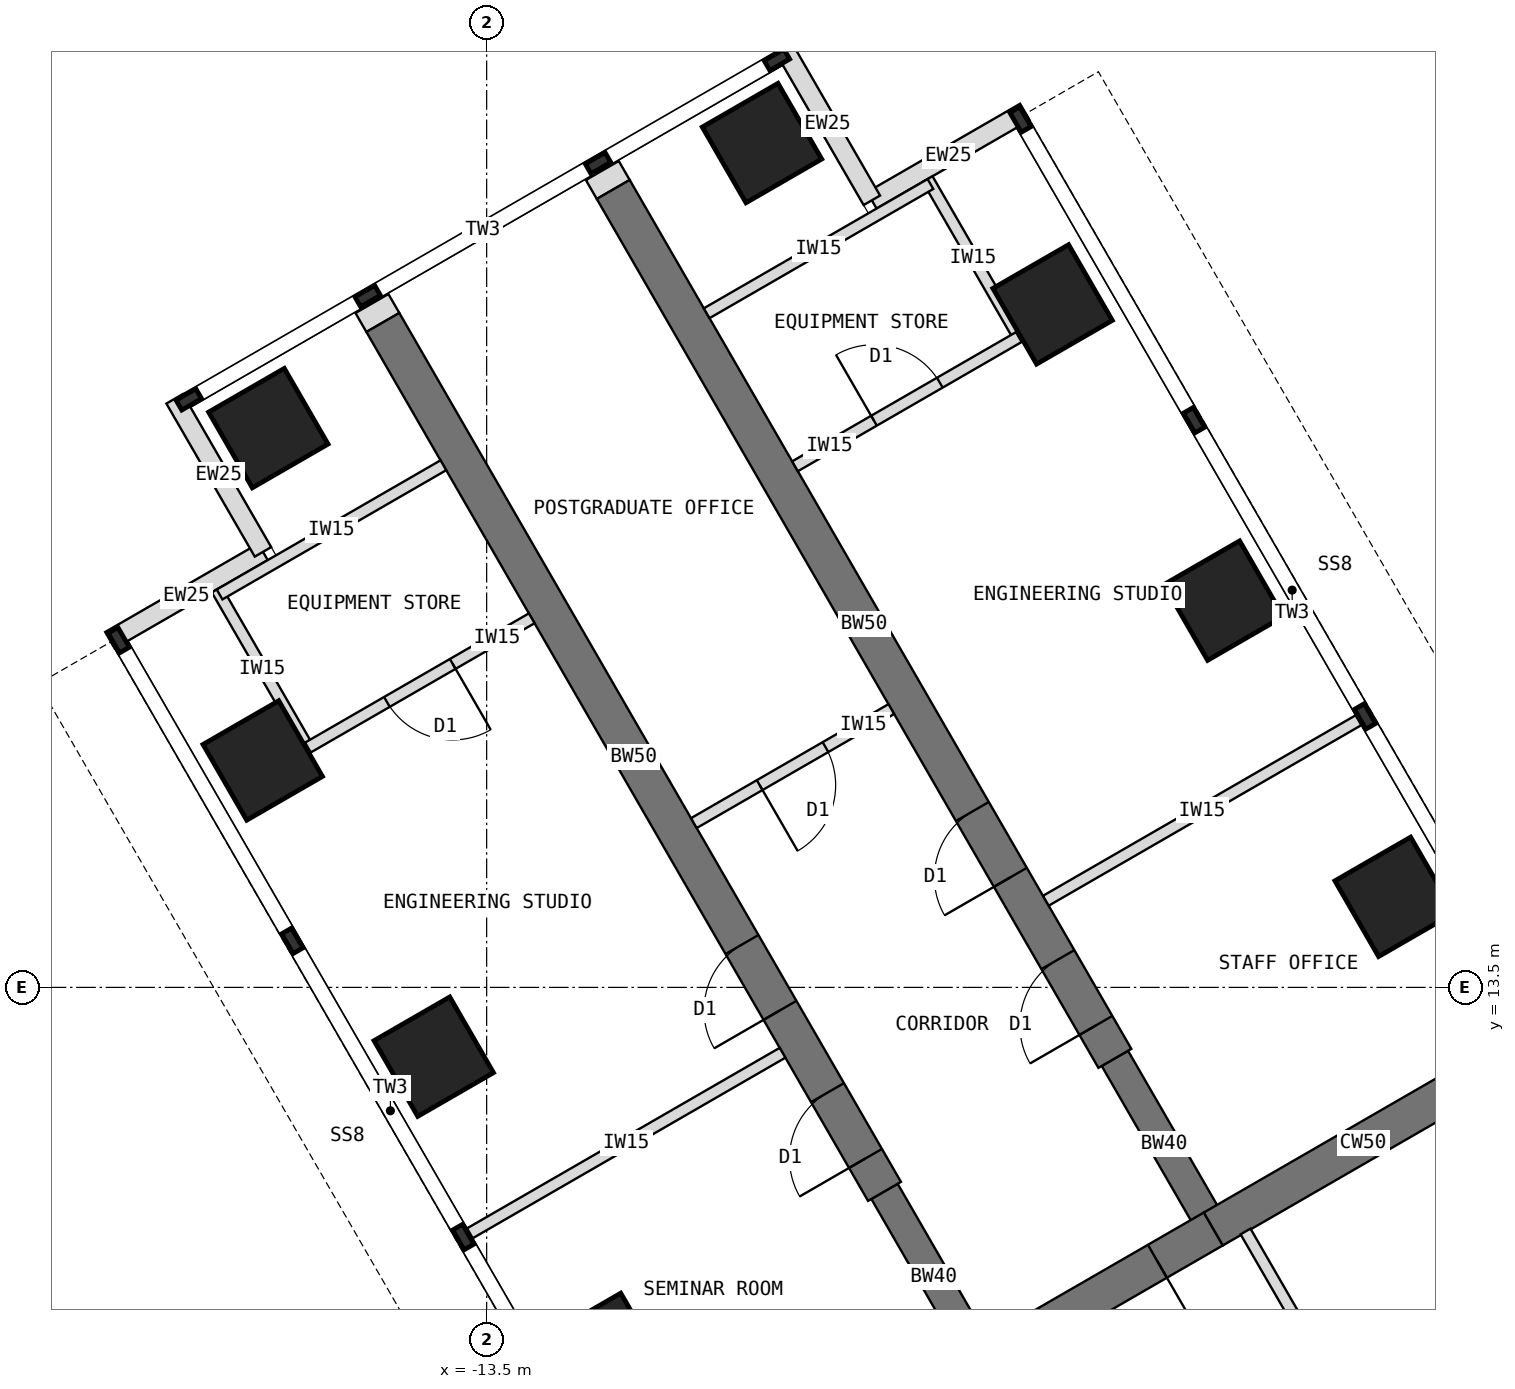
"""IFC4 building model, lengths in metres.
Left out: names, types, materials, properties, quantities, classifications, styles, units other than length and angle.
Written with IfcOpenShell. Run it as: python <this file> out.ifc"""

import sys

from ifc_helpers import new_model, si_unit, direction, frame, frame_2d, origin, origin_2d, place, context, subcontext, project, spatial, rectangle, extrude, element, fill, save


model = new_model("IFC4")
c1 = context("Model", 3, precision=1e-05, world=origin(), true_north=direction((0.0, 1.0)))
c2 = subcontext(c1, "Body", "Model", "MODEL_VIEW")
j1 = project(units=[si_unit("LENGTHUNIT", "METRE"), si_unit("PLANEANGLEUNIT", "RADIAN")], contexts=[c1])
p1 = place(None, origin())
s1 = spatial("IfcSite", under=j1, at=p1, CompositionType="ELEMENT")
p2 = place(p1, origin())
s2 = spatial("IfcBuilding", under=s1, at=p2, CompositionType="ELEMENT")
p3 = place(p2, frame((0.0, 0.0, 206.5)))
s3 = spatial("IfcBuildingStorey", under=s2, at=p3, CompositionType="ELEMENT", Elevation=206.5)
p4 = place(p3, frame((0.0, 12.596, 0.0), z_axis=(0.0, 0.0, 1.0), x_axis=(-0.866011268655, -0.500024481964, 0.0)))
e1 = element("IfcWall", 1, at=p4, inside=s3, PredefinedType="SHEAR", context=c2, shape_type="SweptSolid", body=[
    extrude(rectangle(XDim=4.548, YDim=0.5, at=frame_2d((2.274, 0.0))), origin(), (0.0, 0.0, 1.0), 4.0),
])
p5 = place(p3, frame((-3.939, 10.322, 0.0), z_axis=(0.0, 0.0, 1.0), x_axis=(-0.866019471182, -0.500010275428, 0.0)))
e2 = element("IfcWall", 2, at=p5, inside=s3, PredefinedType="SHEAR", context=c2, shape_type="SweptSolid", body=[
    extrude(rectangle(XDim=3.5, YDim=0.5, at=frame_2d((1.75, 0.0))), origin(), (0.0, 0.0, 1.0), 4.0),
])
p6 = place(p5, frame((0.85, 0.0, 0.0)))
e3 = element("IfcOpeningElement", 3, at=p6, cuts=e2, PredefinedType="OPENING", context=c2, shape_type="SweptSolid", body=[
    extrude(rectangle(XDim=1.8, YDim=2.1, at=frame_2d((0.9, 1.05))), frame((0.0, 0.26, 0.0), z_axis=(0.0, -1.0, 0.0), x_axis=(1.0, 0.0, 0.0)), (0.0, 0.0, 1.0), 0.52),
])
p7 = place(p3, frame((-6.97, 8.572, 0.0), z_axis=(0.0, 0.0, 1.0), x_axis=(-0.499988811324, 0.866031863473, 0.0)))
e4 = element("IfcWall", 4, at=p7, inside=s3, PredefinedType="SHEAR", context=c2, shape_type="SweptSolid", body=[
    extrude(rectangle(XDim=2.592, YDim=0.4, at=frame_2d((1.296, 0.0))), origin(), (0.0, 0.0, 1.0), 4.0),
])
p8 = place(p3, frame((-8.266, 10.816, 0.0), z_axis=(0.0, 0.0, 1.0), x_axis=(-0.499996231654, 0.866027579429, 0.0)))
e5 = element("IfcWall", 5, at=p8, inside=s3, PredefinedType="SHEAR", context=c2, shape_type="SweptSolid", body=[
    extrude(rectangle(XDim=13.2, YDim=0.5, at=frame_2d((6.6, 0.0))), origin(), (0.0, 0.0, 1.0), 4.0),
])
p9 = place(p8, frame((0.5, 0.0, 0.0)))
e6 = element("IfcOpeningElement", 6, at=p9, cuts=e5, PredefinedType="OPENING", context=c2, shape_type="SweptSolid", body=[
    extrude(rectangle(XDim=1.0, YDim=2.1, at=frame_2d((0.5, 1.05))), frame((0.0, 0.26, 0.0), z_axis=(0.0, -1.0, 0.0), x_axis=(1.0, 0.0, 0.0)), (0.0, 0.0, 1.0), 0.52),
])
p10 = place(p8, frame((2.75, 0.0, 0.0)))
e7 = element("IfcOpeningElement", 7, at=p10, cuts=e5, PredefinedType="OPENING", context=c2, shape_type="SweptSolid", body=[
    extrude(rectangle(XDim=1.0, YDim=2.1, at=frame_2d((0.5, 1.05))), frame((0.0, 0.26, 0.0), z_axis=(0.0, -1.0, 0.0), x_axis=(1.0, 0.0, 0.0)), (0.0, 0.0, 1.0), 0.52),
])
p11 = place(p3, frame((-3.939, 10.322, 0.0), z_axis=(0.0, 0.0, 1.0), x_axis=(-0.499918158782, 0.866072649678, 0.0)))
e8 = element("IfcWall", 8, at=p11, inside=s3, PredefinedType="SHEAR", context=c2, shape_type="SweptSolid", body=[
    extrude(rectangle(XDim=2.592, YDim=0.4, at=frame_2d((1.296, 0.0))), origin(), (0.0, 0.0, 1.0), 4.0),
])
p12 = place(p3, frame((-5.234, 12.566, 0.0), z_axis=(0.0, 0.0, 1.0), x_axis=(-0.500010103361, 0.866019570528, 0.0)))
e9 = element("IfcWall", 9, at=p12, inside=s3, PredefinedType="SHEAR", context=c2, shape_type="SweptSolid", body=[
    extrude(rectangle(XDim=13.2, YDim=0.5, at=frame_2d((6.6, 0.0))), origin(), (0.0, 0.0, 1.0), 4.0),
])
p13 = place(p12, frame((0.5, 0.0, 0.0)))
e10 = element("IfcOpeningElement", 10, at=p13, cuts=e9, PredefinedType="OPENING", context=c2, shape_type="SweptSolid", body=[
    extrude(rectangle(XDim=1.0, YDim=2.1, at=frame_2d((0.5, 1.05))), frame((0.0, 0.26, 0.0), z_axis=(0.0, -1.0, 0.0), x_axis=(1.0, 0.0, 0.0)), (0.0, 0.0, 1.0), 0.52),
])
p14 = place(p12, frame((2.75, 0.0, 0.0)))
e11 = element("IfcOpeningElement", 11, at=p14, cuts=e9, PredefinedType="OPENING", context=c2, shape_type="SweptSolid", body=[
    extrude(rectangle(XDim=1.0, YDim=2.1, at=frame_2d((0.5, 1.05))), frame((0.0, 0.26, 0.0), z_axis=(0.0, -1.0, 0.0), x_axis=(1.0, 0.0, 0.0)), (0.0, 0.0, 1.0), 0.52),
])
for number, where, z_axis, x_axis in (
    (12, (-11.946, 8.691, 0.0), (0.0, 0.0, 1.0), (0.866, 0.5, 0.0)),
    (13, (-1.554, 14.691, 0.0), (0.0, 0.0, 1.0), (0.866, 0.5, 0.0)),
    (14, (-14.196, 12.588, 0.0), (0.0, 0.0, 1.0), (0.866, 0.5, 0.0)),
    (15, (-3.804, 18.588, 0.0), (0.0, 0.0, 1.0), (0.866, 0.5, 0.0)),
    (16, (-16.446, 16.486, 0.0), (0.0, 0.0, 1.0), (0.866, 0.5, 0.0)),
    (17, (-6.054, 22.486, 0.0), (0.0, 0.0, 1.0), (0.866, 0.5, 0.0)),
    (18, (-16.373, 20.858, 0.0), (0.0, 0.0, 1.0), (0.866, 0.5, 0.0)),
    (19, (-9.877, 24.608, 0.0), (0.0, 0.0, 1.0), (0.866, 0.5, 0.0)),
):
    element("IfcColumn", number, at=place(p3, frame(where, z_axis=z_axis, x_axis=x_axis)), inside=s3, PredefinedType="COLUMN", context=c2, shape_type="SweptSolid", body=[
        extrude(rectangle(XDim=1.15, YDim=1.15, at=origin_2d()), origin(), (0.0, 0.0, 1.0), 4.0),
    ])
for number, where, z_axis, x_axis in (
    (20, (-18.456, 18.067, 0.0), (0.0, 0.0, 1.0), (0.866, 0.5, 0.0)),
    (21, (-16.443, 19.23, 0.0), (0.0, 0.0, 1.0), (-0.5, 0.866, 0.0)),
    (22, (-6.419, 25.017, 0.0), (0.0, 0.0, 1.0), (-0.866, -0.5, 0.0)),
    (23, (-8.432, 23.855, 0.0), (0.0, 0.0, 1.0), (-0.5, 0.866, 0.0)),
):
    element("IfcWall", number, at=place(p3, frame(where, z_axis=z_axis, x_axis=x_axis)), inside=s3, PredefinedType="STANDARD", context=c2, shape_type="SweptSolid", body=[
        extrude(rectangle(XDim=2.325, YDim=0.25, at=frame_2d((1.163, 0.0))), origin(), (0.0, 0.0, 1.0), 3.8),
    ])
for number, where, z_axis, x_axis in (
    (24, (-14.865, 22.248, 0.0), (0.0, 0.0, 1.0), (-0.5, 0.866, 0.0)),
    (25, (-11.834, 23.998, 0.0), (0.0, 0.0, 1.0), (-0.5, 0.866, 0.0)),
):
    element("IfcWall", number, at=place(p3, frame(where, z_axis=z_axis, x_axis=x_axis)), inside=s3, PredefinedType="PARTITIONING", context=c2, shape_type="SweptSolid", body=[
        extrude(rectangle(XDim=0.288, YDim=0.5, at=frame_2d((0.144, 0.0))), origin(), (0.0, 0.0, 1.0), 3.8),
    ])
p15 = place(p3, frame((-1.201, 6.12, 0.0), z_axis=(0.0, 0.0, 1.0), x_axis=(0.500021575205, 0.866012946976, 0.0)))
e26 = element("IfcWall", 26, at=p15, inside=s3, PredefinedType="SHEAR", context=c2, shape_type="SweptSolid", body=[
    extrude(rectangle(XDim=5.958, YDim=0.4, at=frame_2d((2.979, 0.0))), origin(), (0.0, 0.0, 1.0), 4.0),
])
p16 = place(p3, frame((-9.607, 12.64, 0.0), z_axis=(0.0, 0.0, 1.0), x_axis=(-0.866033238375, -0.499986429846, 0.0)))
e27 = element("IfcWall", 27, at=p16, inside=s3, PredefinedType="PARTITIONING", context=c2, shape_type="SweptSolid", body=[
    extrude(rectangle(XDim=4.75, YDim=0.15, at=frame_2d((2.375, 0.0))), origin(), (0.0, 0.0, 1.0), 3.8),
])
p17 = place(p3, frame((-15.852, 16.656, 0.0), z_axis=(0.0, 0.0, 1.0), x_axis=(-0.500001309137, 0.866024647952, 0.0)))
e28 = element("IfcWall", 28, at=p17, inside=s3, PredefinedType="PARTITIONING", context=c2, shape_type="SweptSolid", body=[
    extrude(rectangle(XDim=2.4, YDim=0.15, at=frame_2d((1.2, 0.0))), origin(), (0.0, 0.0, 1.0), 3.8),
])
p18 = place(p3, frame((-12.907, 18.356, 0.0), z_axis=(0.0, 0.0, 1.0), x_axis=(-0.866038511948, -0.499977295307, 0.0)))
e29 = element("IfcWall", 29, at=p18, inside=s3, PredefinedType="PARTITIONING", context=c2, shape_type="SweptSolid", body=[
    extrude(rectangle(XDim=3.4, YDim=0.15, at=frame_2d((1.7, 0.0))), origin(), (0.0, 0.0, 1.0), 3.8),
])
p19 = place(p18, frame((1.2, 0.0, 0.0)))
e30 = element("IfcOpeningElement", 30, at=p19, cuts=e29, PredefinedType="OPENING", context=c2, shape_type="SweptSolid", body=[
    extrude(rectangle(XDim=1.0, YDim=2.1, at=frame_2d((0.5, 1.05))), frame((0.0, 0.085, 0.0), z_axis=(0.0, -1.0, 0.0), x_axis=(1.0, 0.0, 0.0)), (0.0, 0.0, 1.0), 0.17),
])
p20 = place(p3, frame((-14.07, 20.369, 0.0), z_axis=(0.0, 0.0, 1.0), x_axis=(-0.866020560687, -0.500008388397, 0.0)))
e31 = element("IfcWall", 31, at=p20, inside=s3, PredefinedType="PARTITIONING", context=c2, shape_type="SweptSolid", body=[
    extrude(rectangle(XDim=3.4, YDim=0.15, at=frame_2d((1.7, 0.0))), origin(), (0.0, 0.0, 1.0), 3.8),
])
p21 = place(p3, frame((-6.143, 14.64, 0.0), z_axis=(0.0, 0.0, 1.0), x_axis=(0.866033238375, 0.499986429846, 0.0)))
e32 = element("IfcWall", 32, at=p21, inside=s3, PredefinedType="PARTITIONING", context=c2, shape_type="SweptSolid", body=[
    extrude(rectangle(XDim=4.75, YDim=0.15, at=frame_2d((2.375, 0.0))), origin(), (0.0, 0.0, 1.0), 3.8),
])
p22 = place(p3, frame((-6.499, 22.056, 0.0), z_axis=(0.0, 0.0, 1.0), x_axis=(-0.500001309137, 0.866024647952, 0.0)))
e33 = element("IfcWall", 33, at=p22, inside=s3, PredefinedType="PARTITIONING", context=c2, shape_type="SweptSolid", body=[
    extrude(rectangle(XDim=2.4, YDim=0.15, at=frame_2d((1.2, 0.0))), origin(), (0.0, 0.0, 1.0), 3.8),
])
p23 = place(p3, frame((-9.443, 20.356, 0.0), z_axis=(0.0, 0.0, 1.0), x_axis=(0.866020560687, 0.500008388397, 0.0)))
e34 = element("IfcWall", 34, at=p23, inside=s3, PredefinedType="PARTITIONING", context=c2, shape_type="SweptSolid", body=[
    extrude(rectangle(XDim=3.4, YDim=0.15, at=frame_2d((1.7, 0.0))), origin(), (0.0, 0.0, 1.0), 3.8),
])
p24 = place(p23, frame((1.2, 0.0, 0.0)))
e35 = element("IfcOpeningElement", 35, at=p24, cuts=e34, PredefinedType="OPENING", context=c2, shape_type="SweptSolid", body=[
    extrude(rectangle(XDim=1.0, YDim=2.1, at=frame_2d((0.5, 1.05))), frame((0.0, 0.085, 0.0), z_axis=(0.0, -1.0, 0.0), x_axis=(1.0, 0.0, 0.0)), (0.0, 0.0, 1.0), 0.17),
])
p25 = place(p3, frame((-10.605, 22.369, 0.0), z_axis=(0.0, 0.0, 1.0), x_axis=(0.866038511948, 0.499977295307, 0.0)))
e36 = element("IfcWall", 36, at=p25, inside=s3, PredefinedType="PARTITIONING", context=c2, shape_type="SweptSolid", body=[
    extrude(rectangle(XDim=3.4, YDim=0.15, at=frame_2d((1.7, 0.0))), origin(), (0.0, 0.0, 1.0), 3.8),
])
p26 = place(p3, frame((-3.515, 10.289, 0.0), z_axis=(0.0, 0.0, 1.0), x_axis=(0.499968392031, -0.866043651885, 0.0)))
e37 = element("IfcWall", 37, at=p26, inside=s3, PredefinedType="PARTITIONING", context=c2, shape_type="SweptSolid", body=[
    extrude(rectangle(XDim=4.526, YDim=0.15, at=frame_2d((2.263, 0.0))), origin(), (0.0, 0.0, 1.0), 3.8),
])
p27 = place(p26, frame((2.668, 0.0, 0.0)))
e38 = element("IfcOpeningElement", 38, at=p27, cuts=e37, PredefinedType="OPENING", context=c2, shape_type="SweptSolid", body=[
    extrude(rectangle(XDim=1.0, YDim=2.1, at=frame_2d((0.5, 1.05))), frame((0.0, 0.085, 0.0), z_axis=(0.0, -1.0, 0.0), x_axis=(1.0, 0.0, 0.0)), (0.0, 0.0, 1.0), 0.17),
])
p28 = place(p3, frame((-8.176, 17.161, 0.0), z_axis=(0.0, 0.0, 1.0), x_axis=(-0.866010750942, -0.50002537861, 0.0)))
e39 = element("IfcWall", 39, at=p28, inside=s3, PredefinedType="PARTITIONING", context=c2, shape_type="SweptSolid", body=[
    extrude(rectangle(XDim=3.0, YDim=0.15, at=frame_2d((1.5, 0.0))), origin(), (0.0, 0.0, 1.0), 3.8),
])
p29 = place(p28, frame((1.0, 0.0, 0.0)))
e40 = element("IfcOpeningElement", 40, at=p29, cuts=e39, PredefinedType="OPENING", context=c2, shape_type="SweptSolid", body=[
    extrude(rectangle(XDim=1.0, YDim=2.1, at=frame_2d((0.5, 1.05))), frame((0.0, 0.085, 0.0), z_axis=(0.0, -1.0, 0.0), x_axis=(1.0, 0.0, 0.0)), (0.0, 0.0, 1.0), 0.17),
])
p30 = place(p6, origin())
e41 = element("IfcDoor", 41, at=p30, inside=s3, OperationType="DOUBLE_DOOR_DOUBLE_SWING", PredefinedType="DOOR", context=c2, shape_type="SweptSolid", body=[
    extrude(rectangle(XDim=1.8, YDim=2.1, at=frame_2d((0.9, 1.05))), frame((0.0, 0.025, 0.0), z_axis=(0.0, -1.0, 0.0), x_axis=(1.0, 0.0, 0.0)), (0.0, 0.0, 1.0), 0.05),
])
fill(e3, e41)
p31 = place(p19, origin())
e42 = element("IfcDoor", 42, at=p31, inside=s3, OperationType="SINGLE_SWING_LEFT", PredefinedType="DOOR", context=c2, shape_type="SweptSolid", body=[
    extrude(rectangle(XDim=1.0, YDim=2.1, at=frame_2d((0.5, 1.05))), frame((0.0, 0.025, 0.0), z_axis=(0.0, -1.0, 0.0), x_axis=(1.0, 0.0, 0.0)), (0.0, 0.0, 1.0), 0.05),
])
fill(e30, e42)
p32 = place(p24, origin())
e43 = element("IfcDoor", 43, at=p32, inside=s3, OperationType="SINGLE_SWING_LEFT", PredefinedType="DOOR", context=c2, shape_type="SweptSolid", body=[
    extrude(rectangle(XDim=1.0, YDim=2.1, at=frame_2d((0.5, 1.05))), frame((0.0, 0.025, 0.0), z_axis=(0.0, -1.0, 0.0), x_axis=(1.0, 0.0, 0.0)), (0.0, 0.0, 1.0), 0.05),
])
fill(e35, e43)
p33 = place(p29, origin())
e44 = element("IfcDoor", 44, at=p33, inside=s3, OperationType="SINGLE_SWING_RIGHT", PredefinedType="DOOR", context=c2, shape_type="SweptSolid", body=[
    extrude(rectangle(XDim=1.0, YDim=2.1, at=frame_2d((0.5, 1.05))), frame((0.0, 0.025, 0.0), z_axis=(0.0, -1.0, 0.0), x_axis=(1.0, 0.0, 0.0)), (0.0, 0.0, 1.0), 0.05),
])
fill(e40, e44)
p34 = place(p9, origin())
e45 = element("IfcDoor", 45, at=p34, inside=s3, OperationType="SINGLE_SWING_LEFT", PredefinedType="DOOR", context=c2, shape_type="SweptSolid", body=[
    extrude(rectangle(XDim=1.0, YDim=2.1, at=frame_2d((0.5, 1.05))), frame((0.0, 0.025, 0.0), z_axis=(0.0, -1.0, 0.0), x_axis=(1.0, 0.0, 0.0)), (0.0, 0.0, 1.0), 0.05),
])
fill(e6, e45)
p35 = place(p10, origin())
e46 = element("IfcDoor", 46, at=p35, inside=s3, OperationType="SINGLE_SWING_LEFT", PredefinedType="DOOR", context=c2, shape_type="SweptSolid", body=[
    extrude(rectangle(XDim=1.0, YDim=2.1, at=frame_2d((0.5, 1.05))), frame((0.0, 0.025, 0.0), z_axis=(0.0, -1.0, 0.0), x_axis=(1.0, 0.0, 0.0)), (0.0, 0.0, 1.0), 0.05),
])
fill(e7, e46)
p36 = place(p13, origin())
e47 = element("IfcDoor", 47, at=p36, inside=s3, OperationType="SINGLE_SWING_LEFT", PredefinedType="DOOR", context=c2, shape_type="SweptSolid", body=[
    extrude(rectangle(XDim=1.0, YDim=2.1, at=frame_2d((0.5, 1.05))), frame((0.0, 0.025, 0.0), z_axis=(0.0, -1.0, 0.0), x_axis=(1.0, 0.0, 0.0)), (0.0, 0.0, 1.0), 0.05),
])
fill(e10, e47)
p37 = place(p14, origin())
e48 = element("IfcDoor", 48, at=p37, inside=s3, OperationType="SINGLE_SWING_LEFT", PredefinedType="DOOR", context=c2, shape_type="SweptSolid", body=[
    extrude(rectangle(XDim=1.0, YDim=2.1, at=frame_2d((0.5, 1.05))), frame((0.0, 0.025, 0.0), z_axis=(0.0, -1.0, 0.0), x_axis=(1.0, 0.0, 0.0)), (0.0, 0.0, 1.0), 0.05),
])
fill(e11, e48)
save(model, sys.argv[1])
